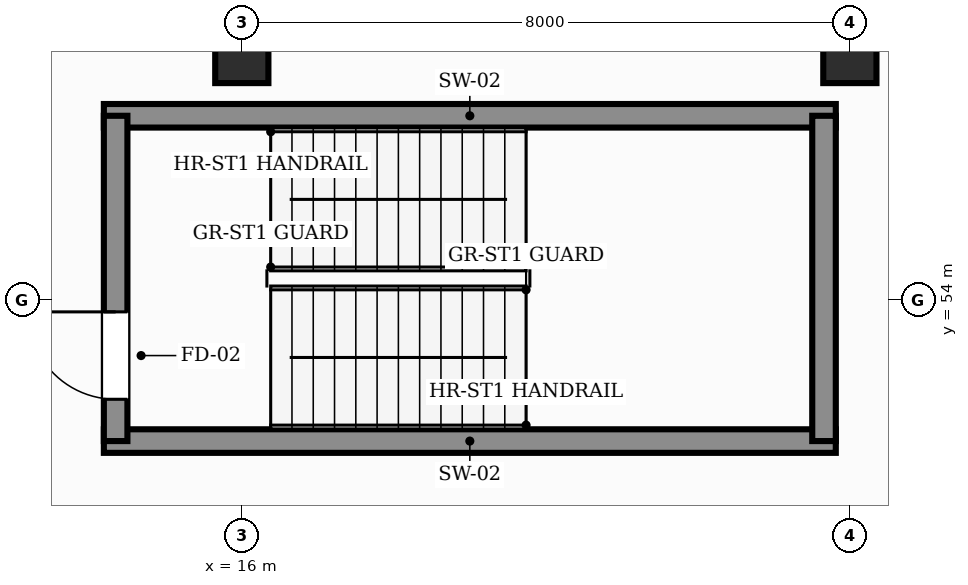
"""IFC4 building model, lengths in metres.
Left out: names, types, materials, properties, quantities, classifications, styles, units other than length and angle.
Written with IfcOpenShell. Run it as: python <this file> out.ifc"""

import sys

from ifc_helpers import new_model, si_unit, direction, frame, frame_2d, origin, origin_2d, place, context, subcontext, project, spatial, rectangle, extrude, element, fill, save


model = new_model("IFC4")
c1 = context("Model", 3, precision=1e-05, world=origin(), true_north=direction((0.0, 1.0)))
c2 = subcontext(c1, "Body", "Model", "MODEL_VIEW")
j1 = project(units=[si_unit("LENGTHUNIT", "METRE"), si_unit("PLANEANGLEUNIT", "RADIAN")], contexts=[c1])
p1 = place(None, origin())
s1 = spatial("IfcSite", under=j1, at=p1, CompositionType="ELEMENT")
p2 = place(p1, origin())
s2 = spatial("IfcBuilding", under=s1, at=p2, CompositionType="ELEMENT")
p3 = place(p2, frame((0.0, 0.0, -4.8)))
s3 = spatial("IfcBuildingStorey", under=s2, at=p3, CompositionType="ELEMENT", Elevation=-4.8)
for number, where, z_axis, x_axis in (
    (1, (16.0, 57.2, 0.0), (0.0, 0.0, 1.0), (1.0, 0.0, 0.0)),
    (2, (24.0, 57.2, 0.0), (0.0, 0.0, 1.0), (1.0, 0.0, 0.0)),
):
    element("IfcColumn", number, at=place(p3, frame(where, z_axis=z_axis, x_axis=x_axis)), inside=s3, PredefinedType="COLUMN", context=c2, shape_type="SweptSolid", body=[
        extrude(rectangle(XDim=0.7, YDim=0.7, at=origin_2d()), origin(), (0.0, 0.0, 1.0), 4.8),
    ])
for number, where, z_axis, x_axis in (
    (3, (14.185, 52.14, 0.0), (0.0, 0.0, 1.0), (1.0, 0.0, 0.0)),
    (4, (14.185, 56.42, 0.0), (0.0, 0.0, 1.0), (1.0, 0.0, 0.0)),
):
    element("IfcWall", number, at=place(p3, frame(where, z_axis=z_axis, x_axis=x_axis)), inside=s3, PredefinedType="SHEAR", context=c2, shape_type="SweptSolid", body=[
        extrude(rectangle(XDim=9.63, YDim=0.31, at=frame_2d((4.815, 0.0))), origin(), (0.0, 0.0, 1.0), 4.8),
    ])
p4 = place(p3, frame((14.34, 52.14, 0.0), z_axis=(0.0, 0.0, 1.0), x_axis=(0.0, 1.0, 0.0)))
e5 = element("IfcWall", 5, at=p4, inside=s3, PredefinedType="SHEAR", context=c2, shape_type="SweptSolid", body=[
    extrude(rectangle(XDim=4.28, YDim=0.31, at=frame_2d((2.14, 0.0))), origin(), (0.0, 0.0, 1.0), 4.8),
])
p5 = place(p4, frame((0.55, 0.0, 0.0)))
e6 = element("IfcOpeningElement", 6, at=p5, cuts=e5, PredefinedType="OPENING", context=c2, shape_type="SweptSolid", body=[
    extrude(rectangle(XDim=1.15, YDim=2.2, at=frame_2d((0.575, 1.1))), frame((0.0, 0.165, 0.0), z_axis=(0.0, -1.0, 0.0), x_axis=(1.0, 0.0, 0.0)), (0.0, 0.0, 1.0), 0.33),
])
p6 = place(p3, frame((23.66, 52.14, 0.0), z_axis=(0.0, 0.0, 1.0), x_axis=(0.0, 1.0, 0.0)))
e7 = element("IfcWall", 7, at=p6, inside=s3, PredefinedType="SHEAR", context=c2, shape_type="SweptSolid", body=[
    extrude(rectangle(XDim=4.28, YDim=0.31, at=frame_2d((2.14, 0.0))), origin(), (0.0, 0.0, 1.0), 4.8),
])
p7 = place(p5, origin())
e8 = element("IfcDoor", 8, at=p7, inside=s3, OperationType="SINGLE_SWING_RIGHT", PredefinedType="DOOR", context=c2, shape_type="SweptSolid", body=[
    extrude(rectangle(XDim=1.15, YDim=2.2, at=frame_2d((0.575, 1.1))), frame((0.0, 0.025, 0.0), z_axis=(0.0, -1.0, 0.0), x_axis=(1.0, 0.0, 0.0)), (0.0, 0.0, 1.0), 0.05),
])
fill(e6, e8)
save(model, sys.argv[1])
